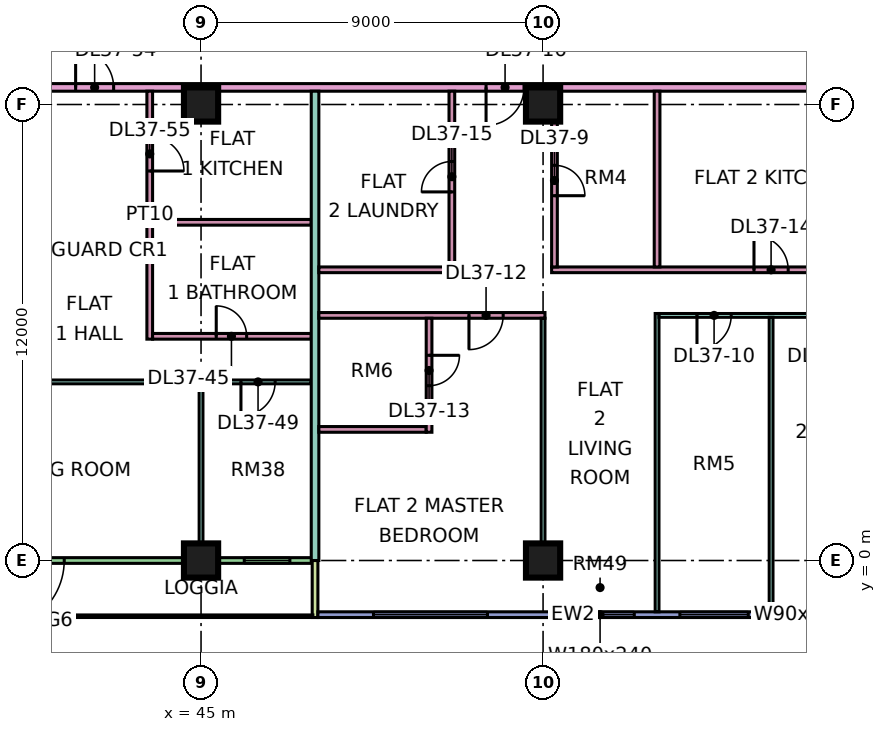
"""IFC4 building model, lengths in metres.
Left out: names, types, materials, properties, quantities, classifications, styles, units other than length and angle.
Written with IfcOpenShell. Run it as: python <this file> out.ifc"""

import sys

from ifc_helpers import new_model, si_unit, direction, frame, frame_2d, origin, origin_2d, place, context, subcontext, project, spatial, rectangle, extrude, element, fill, save


model = new_model("IFC4")
c1 = context("Model", 3, precision=1e-05, world=origin(), true_north=direction((0.0, 1.0)))
c2 = subcontext(c1, "Body", "Model", "MODEL_VIEW")
j1 = project(units=[si_unit("LENGTHUNIT", "METRE"), si_unit("PLANEANGLEUNIT", "RADIAN")], contexts=[c1])
p1 = place(None, origin())
s1 = spatial("IfcSite", under=j1, at=p1, CompositionType="ELEMENT")
p2 = place(p1, origin())
s2 = spatial("IfcBuilding", under=s1, at=p2, CompositionType="ELEMENT")
p3 = place(p2, frame((0.0, 0.0, 164.9)))
s3 = spatial("IfcBuildingStorey", under=s2, at=p3, CompositionType="ELEMENT", Elevation=164.9)
for number, where, z_axis, x_axis in (
    (1, (45.0, 0.0, 0.0), (0.0, 0.0, 1.0), (1.0, 0.0, 0.0)),
    (2, (45.0, 12.0, 0.0), (0.0, 0.0, 1.0), (1.0, 0.0, 0.0)),
    (3, (54.0, 0.0, 0.0), (0.0, 0.0, 1.0), (1.0, 0.0, 0.0)),
    (4, (54.0, 12.0, 0.0), (0.0, 0.0, 1.0), (1.0, 0.0, 0.0)),
):
    element("IfcColumn", number, at=place(p3, frame(where, z_axis=z_axis, x_axis=x_axis)), inside=s3, PredefinedType="COLUMN", context=c2, shape_type="SweptSolid", body=[
        extrude(rectangle(XDim=0.9, YDim=0.9, at=origin_2d()), origin(), (0.0, 0.0, 1.0), 3.75),
    ])
p4 = place(p3, frame((36.075, 0.0, 0.0), z_axis=(0.0, 0.0, 1.0), x_axis=(1.0, 0.0, 0.0)))
e5 = element("IfcWall", 5, at=p4, inside=s3, PredefinedType="SOLIDWALL", context=c2, shape_type="SweptSolid", body=[
    extrude(rectangle(XDim=11.85, YDim=0.15, at=frame_2d((5.925, 0.0))), origin(), (0.0, 0.0, 1.0), 3.35),
])
p5 = place(p4, frame((3.525, 0.0, 0.0)))
e6 = element("IfcOpeningElement", 6, at=p5, cuts=e5, PredefinedType="OPENING", context=c2, shape_type="SweptSolid", body=[
    extrude(rectangle(XDim=1.8, YDim=2.4, at=frame_2d((0.9, 1.2))), frame((0.0, 0.085, 0.0), z_axis=(0.0, -1.0, 0.0), x_axis=(1.0, 0.0, 0.0)), (0.0, 0.0, 1.0), 0.17),
])
p6 = place(p4, frame((10.062, 0.0, 0.45)))
e7 = element("IfcOpeningElement", 7, at=p6, cuts=e5, PredefinedType="OPENING", context=c2, shape_type="SweptSolid", body=[
    extrude(rectangle(XDim=1.2, YDim=2.4, at=frame_2d((0.6, 1.2))), frame((0.0, 0.085, 0.0), z_axis=(0.0, -1.0, 0.0), x_axis=(1.0, 0.0, 0.0)), (0.0, 0.0, 1.0), 0.17),
])
p7 = place(p3, frame((48.0, -1.5, 0.0), z_axis=(0.0, 0.0, 1.0), x_axis=(0.0, 1.0, 0.0)))
e8 = element("IfcWall", 8, at=p7, inside=s3, PredefinedType="SOLIDWALL", context=c2, shape_type="SweptSolid", body=[
    extrude(rectangle(XDim=1.5, YDim=0.15, at=frame_2d((0.75, 0.0))), origin(), (0.0, 0.0, 1.0), 3.35),
])
p8 = place(p3, frame((48.075, -1.425, 0.0), z_axis=(0.0, 0.0, 1.0), x_axis=(1.0, 0.0, 0.0)))
e9 = element("IfcWall", 9, at=p8, inside=s3, PredefinedType="SOLIDWALL", context=c2, shape_type="SweptSolid", body=[
    extrude(rectangle(XDim=13.425, YDim=0.15, at=frame_2d((6.712, 0.0))), origin(), (0.0, 0.0, 1.0), 3.35),
])
p9 = place(p8, frame((1.462, 0.0, 0.45)))
e10 = element("IfcOpeningElement", 10, at=p9, cuts=e9, PredefinedType="OPENING", context=c2, shape_type="SweptSolid", body=[
    extrude(rectangle(XDim=3.0, YDim=2.4, at=frame_2d((1.5, 1.2))), frame((0.0, 0.085, 0.0), z_axis=(0.0, -1.0, 0.0), x_axis=(1.0, 0.0, 0.0)), (0.0, 0.0, 1.0), 0.17),
])
p10 = place(p8, frame((6.525, 0.0, 0.45)))
e11 = element("IfcOpeningElement", 11, at=p10, cuts=e9, PredefinedType="OPENING", context=c2, shape_type="SweptSolid", body=[
    extrude(rectangle(XDim=1.8, YDim=2.4, at=frame_2d((0.9, 1.2))), frame((0.0, 0.085, 0.0), z_axis=(0.0, -1.0, 0.0), x_axis=(1.0, 0.0, 0.0)), (0.0, 0.0, 1.0), 0.17),
])
p11 = place(p8, frame((9.525, 0.0, 0.45)))
e12 = element("IfcOpeningElement", 12, at=p11, cuts=e9, PredefinedType="OPENING", context=c2, shape_type="SweptSolid", body=[
    extrude(rectangle(XDim=1.8, YDim=2.4, at=frame_2d((0.9, 1.2))), frame((0.0, 0.085, 0.0), z_axis=(0.0, -1.0, 0.0), x_axis=(1.0, 0.0, 0.0)), (0.0, 0.0, 1.0), 0.17),
])
p12 = place(p8, frame((12.225, 0.0, 0.45)))
e13 = element("IfcOpeningElement", 13, at=p12, cuts=e9, PredefinedType="OPENING", context=c2, shape_type="SweptSolid", body=[
    extrude(rectangle(XDim=0.9, YDim=2.4, at=frame_2d((0.45, 1.2))), frame((0.0, 0.085, 0.0), z_axis=(0.0, -1.0, 0.0), x_axis=(1.0, 0.0, 0.0)), (0.0, 0.0, 1.0), 0.17),
])
p13 = place(p3, frame((33.05, 4.7, 0.0), z_axis=(0.0, 0.0, 1.0), x_axis=(1.0, 0.0, 0.0)))
e14 = element("IfcWall", 14, at=p13, inside=s3, PredefinedType="PARTITIONING", context=c2, shape_type="SweptSolid", body=[
    extrude(rectangle(XDim=14.85, YDim=0.1, at=frame_2d((7.425, 0.0))), origin(), (0.0, 0.0, 1.0), 3.35),
])
p14 = place(p13, frame((1.0, 0.0, 0.0)))
e15 = element("IfcOpeningElement", 15, at=p14, cuts=e14, PredefinedType="OPENING", context=c2, shape_type="SweptSolid", body=[
    extrude(rectangle(XDim=0.9, YDim=2.1, at=frame_2d((0.45, 1.05))), frame((0.0, 0.06, 0.0), z_axis=(0.0, -1.0, 0.0), x_axis=(1.0, 0.0, 0.0)), (0.0, 0.0, 1.0), 0.12),
])
p15 = place(p13, frame((13.0, 0.0, 0.0)))
e16 = element("IfcOpeningElement", 16, at=p15, cuts=e14, PredefinedType="OPENING", context=c2, shape_type="SweptSolid", body=[
    extrude(rectangle(XDim=0.9, YDim=2.1, at=frame_2d((0.45, 1.05))), frame((0.0, 0.06, 0.0), z_axis=(0.0, -1.0, 0.0), x_axis=(1.0, 0.0, 0.0)), (0.0, 0.0, 1.0), 0.12),
])
p16 = place(p13, frame((7.0, 0.0, 0.0)))
e17 = element("IfcOpeningElement", 17, at=p16, cuts=e14, PredefinedType="OPENING", context=c2, shape_type="SweptSolid", body=[
    extrude(rectangle(XDim=0.9, YDim=2.1, at=frame_2d((0.45, 1.05))), frame((0.0, 0.06, 0.0), z_axis=(0.0, -1.0, 0.0), x_axis=(1.0, 0.0, 0.0)), (0.0, 0.0, 1.0), 0.12),
])
p17 = place(p3, frame((40.65, 12.45, 0.0), z_axis=(0.0, 0.0, 1.0), x_axis=(1.0, 0.0, 0.0)))
e18 = element("IfcWall", 18, at=p17, inside=s3, PredefinedType="PARTITIONING", context=c2, shape_type="SweptSolid", body=[
    extrude(rectangle(XDim=22.276, YDim=0.2, at=frame_2d((11.138, 0.0))), origin(), (0.0, 0.0, 1.0), 3.35),
])
p18 = place(p17, frame((11.85, 0.0, 0.0)))
e19 = element("IfcOpeningElement", 19, at=p18, cuts=e18, PredefinedType="OPENING", context=c2, shape_type="SweptSolid", body=[
    extrude(rectangle(XDim=1.0, YDim=2.1, at=frame_2d((0.5, 1.05))), frame((0.0, 0.11, 0.0), z_axis=(0.0, -1.0, 0.0), x_axis=(1.0, 0.0, 0.0)), (0.0, 0.0, 1.0), 0.22),
])
p19 = place(p17, frame((1.05, 0.0, 0.0)))
e20 = element("IfcOpeningElement", 20, at=p19, cuts=e18, PredefinedType="OPENING", context=c2, shape_type="SweptSolid", body=[
    extrude(rectangle(XDim=1.0, YDim=2.1, at=frame_2d((0.5, 1.05))), frame((0.0, 0.11, 0.0), z_axis=(0.0, -1.0, 0.0), x_axis=(1.0, 0.0, 0.0)), (0.0, 0.0, 1.0), 0.22),
])
p20 = place(p3, frame((43.65, 5.825, 0.0), z_axis=(0.0, 0.0, 1.0), x_axis=(0.0, 1.0, 0.0)))
e21 = element("IfcWall", 21, at=p20, inside=s3, PredefinedType="PARTITIONING", context=c2, shape_type="SweptSolid", body=[
    extrude(rectangle(XDim=6.525, YDim=0.15, at=frame_2d((3.263, 0.0))), origin(), (0.0, 0.0, 1.0), 3.35),
])
p21 = place(p20, frame((4.425, 0.0, 0.0)))
e22 = element("IfcOpeningElement", 22, at=p21, cuts=e21, PredefinedType="OPENING", context=c2, shape_type="SweptSolid", body=[
    extrude(rectangle(XDim=0.9, YDim=2.1, at=frame_2d((0.45, 1.05))), frame((0.0, 0.085, 0.0), z_axis=(0.0, -1.0, 0.0), x_axis=(1.0, 0.0, 0.0)), (0.0, 0.0, 1.0), 0.17),
])
p22 = place(p3, frame((43.725, 5.9, 0.0), z_axis=(0.0, 0.0, 1.0), x_axis=(1.0, 0.0, 0.0)))
e23 = element("IfcWall", 23, at=p22, inside=s3, PredefinedType="PARTITIONING", context=c2, shape_type="SweptSolid", body=[
    extrude(rectangle(XDim=4.175, YDim=0.15, at=frame_2d((2.087, 0.0))), origin(), (0.0, 0.0, 1.0), 3.35),
])
p23 = place(p22, frame((1.675, 0.0, 0.0)))
e24 = element("IfcOpeningElement", 24, at=p23, cuts=e23, PredefinedType="OPENING", context=c2, shape_type="SweptSolid", body=[
    extrude(rectangle(XDim=0.8, YDim=2.1, at=frame_2d((0.4, 1.05))), frame((0.0, 0.085, 0.0), z_axis=(0.0, -1.0, 0.0), x_axis=(1.0, 0.0, 0.0)), (0.0, 0.0, 1.0), 0.17),
])
p24 = place(p3, frame((43.725, 8.9, 0.0), z_axis=(0.0, 0.0, 1.0), x_axis=(1.0, 0.0, 0.0)))
e25 = element("IfcWall", 25, at=p24, inside=s3, PredefinedType="PARTITIONING", context=c2, shape_type="SweptSolid", body=[
    extrude(rectangle(XDim=4.175, YDim=0.15, at=frame_2d((2.087, 0.0))), origin(), (0.0, 0.0, 1.0), 3.35),
])
p25 = place(p3, frame((45.0, 0.074, 0.0), z_axis=(0.0, 0.0, 1.0), x_axis=(0.0, 1.0, 0.0)))
e26 = element("IfcWall", 26, at=p25, inside=s3, PredefinedType="PARTITIONING", context=c2, shape_type="SweptSolid", body=[
    extrude(rectangle(XDim=4.576, YDim=0.1, at=frame_2d((2.288, 0.0))), origin(), (0.0, 0.0, 1.0), 3.35),
])
p26 = place(p3, frame((48.0, 0.0, 0.0), z_axis=(0.0, 0.0, 1.0), x_axis=(0.0, 1.0, 0.0)))
e27 = element("IfcWall", 27, at=p26, inside=s3, PredefinedType="PARTITIONING", context=c2, shape_type="SweptSolid", body=[
    extrude(rectangle(XDim=12.35, YDim=0.2, at=frame_2d((6.175, 0.0))), origin(), (0.0, 0.0, 1.0), 3.35),
])
p27 = place(p3, frame((48.1, 3.45, 0.0), z_axis=(0.0, 0.0, 1.0), x_axis=(1.0, 0.0, 0.0)))
e28 = element("IfcWall", 28, at=p27, inside=s3, PredefinedType="PARTITIONING", context=c2, shape_type="SweptSolid", body=[
    extrude(rectangle(XDim=2.825, YDim=0.15, at=frame_2d((1.413, 0.0))), origin(), (0.0, 0.0, 1.0), 3.35),
])
p28 = place(p3, frame((48.1, 6.45, 0.0), z_axis=(0.0, 0.0, 1.0), x_axis=(1.0, 0.0, 0.0)))
e29 = element("IfcWall", 29, at=p28, inside=s3, PredefinedType="PARTITIONING", context=c2, shape_type="SweptSolid", body=[
    extrude(rectangle(XDim=5.95, YDim=0.15, at=frame_2d((2.975, 0.0))), origin(), (0.0, 0.0, 1.0), 3.35),
])
p29 = place(p28, frame((3.95, 0.0, 0.0)))
e30 = element("IfcOpeningElement", 30, at=p29, cuts=e29, PredefinedType="OPENING", context=c2, shape_type="SweptSolid", body=[
    extrude(rectangle(XDim=0.9, YDim=2.1, at=frame_2d((0.45, 1.05))), frame((0.0, 0.085, 0.0), z_axis=(0.0, -1.0, 0.0), x_axis=(1.0, 0.0, 0.0)), (0.0, 0.0, 1.0), 0.17),
])
p30 = place(p3, frame((48.1, 7.65, 0.0), z_axis=(0.0, 0.0, 1.0), x_axis=(1.0, 0.0, 0.0)))
e31 = element("IfcWall", 31, at=p30, inside=s3, PredefinedType="PARTITIONING", context=c2, shape_type="SweptSolid", body=[
    extrude(rectangle(XDim=3.425, YDim=0.15, at=frame_2d((1.712, 0.0))), origin(), (0.0, 0.0, 1.0), 3.35),
])
p31 = place(p3, frame((51.0, 3.375, 0.0), z_axis=(0.0, 0.0, 1.0), x_axis=(0.0, 1.0, 0.0)))
e32 = element("IfcWall", 32, at=p31, inside=s3, PredefinedType="PARTITIONING", context=c2, shape_type="SweptSolid", body=[
    extrude(rectangle(XDim=3.0, YDim=0.15, at=frame_2d((1.5, 0.0))), origin(), (0.0, 0.0, 1.0), 3.35),
])
p32 = place(p31, frame((1.225, 0.0, 0.0)))
e33 = element("IfcOpeningElement", 33, at=p32, cuts=e32, PredefinedType="OPENING", context=c2, shape_type="SweptSolid", body=[
    extrude(rectangle(XDim=0.8, YDim=2.1, at=frame_2d((0.4, 1.05))), frame((0.0, 0.085, 0.0), z_axis=(0.0, -1.0, 0.0), x_axis=(1.0, 0.0, 0.0)), (0.0, 0.0, 1.0), 0.17),
])
p33 = place(p3, frame((51.6, 7.575, 0.0), z_axis=(0.0, 0.0, 1.0), x_axis=(0.0, 1.0, 0.0)))
e34 = element("IfcWall", 34, at=p33, inside=s3, PredefinedType="PARTITIONING", context=c2, shape_type="SweptSolid", body=[
    extrude(rectangle(XDim=4.775, YDim=0.15, at=frame_2d((2.388, 0.0))), origin(), (0.0, 0.0, 1.0), 3.35),
])
p34 = place(p33, frame((2.125, 0.0, 0.0)))
e35 = element("IfcOpeningElement", 35, at=p34, cuts=e34, PredefinedType="OPENING", context=c2, shape_type="SweptSolid", body=[
    extrude(rectangle(XDim=0.8, YDim=2.1, at=frame_2d((0.4, 1.05))), frame((0.0, 0.085, 0.0), z_axis=(0.0, -1.0, 0.0), x_axis=(1.0, 0.0, 0.0)), (0.0, 0.0, 1.0), 0.17),
])
p35 = place(p3, frame((54.0, 0.0, 0.0), z_axis=(0.0, 0.0, 1.0), x_axis=(0.0, 1.0, 0.0)))
e36 = element("IfcWall", 36, at=p35, inside=s3, PredefinedType="PARTITIONING", context=c2, shape_type="SweptSolid", body=[
    extrude(rectangle(XDim=6.375, YDim=0.1, at=frame_2d((3.188, 0.0))), origin(), (0.0, 0.0, 1.0), 3.35),
])
p36 = place(p3, frame((54.225, 7.65, 0.0), z_axis=(0.0, 0.0, 1.0), x_axis=(1.0, 0.0, 0.0)))
e37 = element("IfcWall", 37, at=p36, inside=s3, PredefinedType="PARTITIONING", context=c2, shape_type="SweptSolid", body=[
    extrude(rectangle(XDim=10.125, YDim=0.15, at=frame_2d((5.062, 0.0))), origin(), (0.0, 0.0, 1.0), 3.35),
])
p37 = place(p36, frame((5.325, 0.0, 0.0)))
e38 = element("IfcOpeningElement", 38, at=p37, cuts=e37, PredefinedType="OPENING", context=c2, shape_type="SweptSolid", body=[
    extrude(rectangle(XDim=0.9, YDim=2.1, at=frame_2d((0.45, 1.05))), frame((0.0, 0.085, 0.0), z_axis=(0.0, -1.0, 0.0), x_axis=(1.0, 0.0, 0.0)), (0.0, 0.0, 1.0), 0.17),
])
p38 = place(p3, frame((54.3, 7.725, 0.0), z_axis=(0.0, 0.0, 1.0), x_axis=(0.0, 1.0, 0.0)))
e39 = element("IfcWall", 39, at=p38, inside=s3, PredefinedType="PARTITIONING", context=c2, shape_type="SweptSolid", body=[
    extrude(rectangle(XDim=4.625, YDim=0.15, at=frame_2d((2.312, 0.0))), origin(), (0.0, 0.0, 1.0), 3.35),
])
p39 = place(p38, frame((1.875, 0.0, 0.0)))
e40 = element("IfcOpeningElement", 40, at=p39, cuts=e39, PredefinedType="OPENING", context=c2, shape_type="SweptSolid", body=[
    extrude(rectangle(XDim=0.8, YDim=2.1, at=frame_2d((0.4, 1.05))), frame((0.0, 0.085, 0.0), z_axis=(0.0, -1.0, 0.0), x_axis=(1.0, 0.0, 0.0)), (0.0, 0.0, 1.0), 0.17),
])
p40 = place(p3, frame((57.0, -1.35, 0.0), z_axis=(0.0, 0.0, 1.0), x_axis=(0.0, 1.0, 0.0)))
e41 = element("IfcWall", 41, at=p40, inside=s3, PredefinedType="PARTITIONING", context=c2, shape_type="SweptSolid", body=[
    extrude(rectangle(XDim=7.85, YDim=0.1, at=frame_2d((3.925, 0.0))), origin(), (0.0, 0.0, 1.0), 3.35),
])
p41 = place(p3, frame((57.0, 7.725, 0.0), z_axis=(0.0, 0.0, 1.0), x_axis=(0.0, 1.0, 0.0)))
e42 = element("IfcWall", 42, at=p41, inside=s3, PredefinedType="PARTITIONING", context=c2, shape_type="SweptSolid", body=[
    extrude(rectangle(XDim=4.625, YDim=0.15, at=frame_2d((2.312, 0.0))), origin(), (0.0, 0.0, 1.0), 3.35),
])
p42 = place(p3, frame((57.05, 6.45, 0.0), z_axis=(0.0, 0.0, 1.0), x_axis=(1.0, 0.0, 0.0)))
e43 = element("IfcWall", 43, at=p42, inside=s3, PredefinedType="PARTITIONING", context=c2, shape_type="SweptSolid", body=[
    extrude(rectangle(XDim=7.3, YDim=0.1, at=frame_2d((3.65, 0.0))), origin(), (0.0, 0.0, 1.0), 3.35),
])
p43 = place(p42, frame((1.0, 0.0, 0.0)))
e44 = element("IfcOpeningElement", 44, at=p43, cuts=e43, PredefinedType="OPENING", context=c2, shape_type="SweptSolid", body=[
    extrude(rectangle(XDim=0.9, YDim=2.1, at=frame_2d((0.45, 1.05))), frame((0.0, 0.06, 0.0), z_axis=(0.0, -1.0, 0.0), x_axis=(1.0, 0.0, 0.0)), (0.0, 0.0, 1.0), 0.12),
])
p44 = place(p42, frame((4.0, 0.0, 0.0)))
e45 = element("IfcOpeningElement", 45, at=p44, cuts=e43, PredefinedType="OPENING", context=c2, shape_type="SweptSolid", body=[
    extrude(rectangle(XDim=0.9, YDim=2.1, at=frame_2d((0.45, 1.05))), frame((0.0, 0.06, 0.0), z_axis=(0.0, -1.0, 0.0), x_axis=(1.0, 0.0, 0.0)), (0.0, 0.0, 1.0), 0.12),
])
p45 = place(p3, frame((60.0, -1.351, 0.0), z_axis=(0.0, 0.0, 1.0), x_axis=(0.0, 1.0, 0.0)))
e46 = element("IfcWall", 46, at=p45, inside=s3, PredefinedType="PARTITIONING", context=c2, shape_type="SweptSolid", body=[
    extrude(rectangle(XDim=7.751, YDim=0.1, at=frame_2d((3.875, 0.0))), origin(), (0.0, 0.0, 1.0), 3.35),
])
p46 = place(p5, frame((1.8, 0.0, 0.0), z_axis=(0.0, 0.0, 1.0), x_axis=(-1.0, 0.0, 0.0)))
e47 = element("IfcDoor", 47, at=p46, inside=s3, OperationType="DOUBLE_DOOR_SINGLE_SWING", PredefinedType="DOOR", context=c2, shape_type="SweptSolid", body=[
    extrude(rectangle(XDim=1.8, YDim=2.4, at=frame_2d((0.9, 1.2))), frame((0.0, 0.025, 0.0), z_axis=(0.0, -1.0, 0.0), x_axis=(1.0, 0.0, 0.0)), (0.0, 0.0, 1.0), 0.05),
])
fill(e6, e47)
p47 = place(p6, origin())
e48 = element("IfcWindow", 48, at=p47, inside=s3, PartitioningType="SINGLE_PANEL", PredefinedType="WINDOW", context=c2, shape_type="SweptSolid", body=[
    extrude(rectangle(XDim=1.2, YDim=2.4, at=frame_2d((0.6, 1.2))), frame((0.0, 0.03, 0.0), z_axis=(0.0, -1.0, 0.0), x_axis=(1.0, 0.0, 0.0)), (0.0, 0.0, 1.0), 0.06),
])
fill(e7, e48)
p48 = place(p9, origin())
e49 = element("IfcWindow", 49, at=p48, inside=s3, PartitioningType="SINGLE_PANEL", PredefinedType="WINDOW", context=c2, shape_type="SweptSolid", body=[
    extrude(rectangle(XDim=3.0, YDim=2.4, at=frame_2d((1.5, 1.2))), frame((0.0, 0.03, 0.0), z_axis=(0.0, -1.0, 0.0), x_axis=(1.0, 0.0, 0.0)), (0.0, 0.0, 1.0), 0.06),
])
fill(e10, e49)
p49 = place(p10, origin())
e50 = element("IfcWindow", 50, at=p49, inside=s3, PartitioningType="SINGLE_PANEL", PredefinedType="WINDOW", context=c2, shape_type="SweptSolid", body=[
    extrude(rectangle(XDim=1.8, YDim=2.4, at=frame_2d((0.9, 1.2))), frame((0.0, 0.03, 0.0), z_axis=(0.0, -1.0, 0.0), x_axis=(1.0, 0.0, 0.0)), (0.0, 0.0, 1.0), 0.06),
])
fill(e11, e50)
p50 = place(p11, origin())
e51 = element("IfcWindow", 51, at=p50, inside=s3, PartitioningType="SINGLE_PANEL", PredefinedType="WINDOW", context=c2, shape_type="SweptSolid", body=[
    extrude(rectangle(XDim=1.8, YDim=2.4, at=frame_2d((0.9, 1.2))), frame((0.0, 0.03, 0.0), z_axis=(0.0, -1.0, 0.0), x_axis=(1.0, 0.0, 0.0)), (0.0, 0.0, 1.0), 0.06),
])
fill(e12, e51)
p51 = place(p12, origin())
e52 = element("IfcWindow", 52, at=p51, inside=s3, PartitioningType="SINGLE_PANEL", PredefinedType="WINDOW", context=c2, shape_type="SweptSolid", body=[
    extrude(rectangle(XDim=0.9, YDim=2.4, at=frame_2d((0.45, 1.2))), frame((0.0, 0.03, 0.0), z_axis=(0.0, -1.0, 0.0), x_axis=(1.0, 0.0, 0.0)), (0.0, 0.0, 1.0), 0.06),
])
fill(e13, e52)
p52 = place(p39, frame((0.8, 0.0, 0.0), z_axis=(0.0, 0.0, 1.0), x_axis=(-1.0, 0.0, 0.0)))
e53 = element("IfcDoor", 53, at=p52, inside=s3, OperationType="SINGLE_SWING_LEFT", PredefinedType="DOOR", context=c2, shape_type="SweptSolid", body=[
    extrude(rectangle(XDim=0.8, YDim=2.1, at=frame_2d((0.4, 1.05))), frame((0.0, 0.025, 0.0), z_axis=(0.0, -1.0, 0.0), x_axis=(1.0, 0.0, 0.0)), (0.0, 0.0, 1.0), 0.05),
])
fill(e40, e53)
p53 = place(p43, frame((0.9, 0.0, 0.0), z_axis=(0.0, 0.0, 1.0), x_axis=(-1.0, 0.0, 0.0)))
e54 = element("IfcDoor", 54, at=p53, inside=s3, OperationType="SINGLE_SWING_LEFT", PredefinedType="DOOR", context=c2, shape_type="SweptSolid", body=[
    extrude(rectangle(XDim=0.9, YDim=2.1, at=frame_2d((0.45, 1.05))), frame((0.0, 0.025, 0.0), z_axis=(0.0, -1.0, 0.0), x_axis=(1.0, 0.0, 0.0)), (0.0, 0.0, 1.0), 0.05),
])
fill(e44, e54)
p54 = place(p29, frame((0.9, 0.0, 0.0), z_axis=(0.0, 0.0, 1.0), x_axis=(-1.0, 0.0, 0.0)))
e55 = element("IfcDoor", 55, at=p54, inside=s3, OperationType="SINGLE_SWING_LEFT", PredefinedType="DOOR", context=c2, shape_type="SweptSolid", body=[
    extrude(rectangle(XDim=0.9, YDim=2.1, at=frame_2d((0.45, 1.05))), frame((0.0, 0.025, 0.0), z_axis=(0.0, -1.0, 0.0), x_axis=(1.0, 0.0, 0.0)), (0.0, 0.0, 1.0), 0.05),
])
fill(e30, e55)
p55 = place(p32, origin())
e56 = element("IfcDoor", 56, at=p55, inside=s3, OperationType="SINGLE_SWING_RIGHT", PredefinedType="DOOR", context=c2, shape_type="SweptSolid", body=[
    extrude(rectangle(XDim=0.8, YDim=2.1, at=frame_2d((0.4, 1.05))), frame((0.0, 0.025, 0.0), z_axis=(0.0, -1.0, 0.0), x_axis=(1.0, 0.0, 0.0)), (0.0, 0.0, 1.0), 0.05),
])
fill(e33, e56)
p56 = place(p37, origin())
e57 = element("IfcDoor", 57, at=p56, inside=s3, OperationType="SINGLE_SWING_LEFT", PredefinedType="DOOR", context=c2, shape_type="SweptSolid", body=[
    extrude(rectangle(XDim=0.9, YDim=2.1, at=frame_2d((0.45, 1.05))), frame((0.0, 0.025, 0.0), z_axis=(0.0, -1.0, 0.0), x_axis=(1.0, 0.0, 0.0)), (0.0, 0.0, 1.0), 0.05),
])
fill(e38, e57)
p57 = place(p34, origin())
e58 = element("IfcDoor", 58, at=p57, inside=s3, OperationType="SINGLE_SWING_LEFT", PredefinedType="DOOR", context=c2, shape_type="SweptSolid", body=[
    extrude(rectangle(XDim=0.8, YDim=2.1, at=frame_2d((0.4, 1.05))), frame((0.0, 0.025, 0.0), z_axis=(0.0, -1.0, 0.0), x_axis=(1.0, 0.0, 0.0)), (0.0, 0.0, 1.0), 0.05),
])
fill(e35, e58)
p58 = place(p18, frame((1.0, 0.0, 0.0), z_axis=(0.0, 0.0, 1.0), x_axis=(-1.0, 0.0, 0.0)))
e59 = element("IfcDoor", 59, at=p58, inside=s3, OperationType="SINGLE_SWING_LEFT", PredefinedType="DOOR", context=c2, shape_type="SweptSolid", body=[
    extrude(rectangle(XDim=1.0, YDim=2.1, at=frame_2d((0.5, 1.05))), frame((0.0, 0.025, 0.0), z_axis=(0.0, -1.0, 0.0), x_axis=(1.0, 0.0, 0.0)), (0.0, 0.0, 1.0), 0.05),
])
fill(e19, e59)
p59 = place(p23, origin())
e60 = element("IfcDoor", 60, at=p59, inside=s3, OperationType="SINGLE_SWING_LEFT", PredefinedType="DOOR", context=c2, shape_type="SweptSolid", body=[
    extrude(rectangle(XDim=0.8, YDim=2.1, at=frame_2d((0.4, 1.05))), frame((0.0, 0.025, 0.0), z_axis=(0.0, -1.0, 0.0), x_axis=(1.0, 0.0, 0.0)), (0.0, 0.0, 1.0), 0.05),
])
fill(e24, e60)
p60 = place(p15, frame((0.9, 0.0, 0.0), z_axis=(0.0, 0.0, 1.0), x_axis=(-1.0, 0.0, 0.0)))
e61 = element("IfcDoor", 61, at=p60, inside=s3, OperationType="SINGLE_SWING_LEFT", PredefinedType="DOOR", context=c2, shape_type="SweptSolid", body=[
    extrude(rectangle(XDim=0.9, YDim=2.1, at=frame_2d((0.45, 1.05))), frame((0.0, 0.025, 0.0), z_axis=(0.0, -1.0, 0.0), x_axis=(1.0, 0.0, 0.0)), (0.0, 0.0, 1.0), 0.05),
])
fill(e16, e61)
p61 = place(p19, origin())
e62 = element("IfcDoor", 62, at=p61, inside=s3, OperationType="SINGLE_SWING_LEFT", PredefinedType="DOOR", context=c2, shape_type="SweptSolid", body=[
    extrude(rectangle(XDim=1.0, YDim=2.1, at=frame_2d((0.5, 1.05))), frame((0.0, 0.025, 0.0), z_axis=(0.0, -1.0, 0.0), x_axis=(1.0, 0.0, 0.0)), (0.0, 0.0, 1.0), 0.05),
])
fill(e20, e62)
p62 = place(p21, frame((0.9, 0.0, 0.0), z_axis=(0.0, 0.0, 1.0), x_axis=(-1.0, 0.0, 0.0)))
e63 = element("IfcDoor", 63, at=p62, inside=s3, OperationType="SINGLE_SWING_LEFT", PredefinedType="DOOR", context=c2, shape_type="SweptSolid", body=[
    extrude(rectangle(XDim=0.9, YDim=2.1, at=frame_2d((0.45, 1.05))), frame((0.0, 0.025, 0.0), z_axis=(0.0, -1.0, 0.0), x_axis=(1.0, 0.0, 0.0)), (0.0, 0.0, 1.0), 0.05),
])
fill(e22, e63)
save(model, sys.argv[1])
